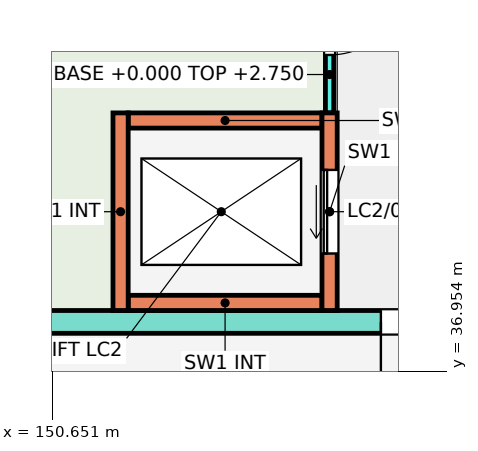
"""IFC4 building model, lengths in metres.
Left out: names, types, materials, properties, quantities, classifications, styles, units other than length and angle.
Written with IfcOpenShell. Run it as: python <this file> out.ifc"""

import sys

from ifc_helpers import new_model, si_unit, direction, frame, frame_2d, origin, place, context, subcontext, project, spatial, rectangle, extrude, element, fill, save


model = new_model("IFC4")
c1 = context("Model", 3, precision=1e-05, world=origin(), true_north=direction((0.0, 1.0)))
c2 = subcontext(c1, "Body", "Model", "MODEL_VIEW")
j1 = project(units=[si_unit("LENGTHUNIT", "METRE"), si_unit("PLANEANGLEUNIT", "RADIAN")], contexts=[c1])
p1 = place(None, origin())
s1 = spatial("IfcSite", under=j1, at=p1, CompositionType="ELEMENT")
p2 = place(p1, origin())
s2 = spatial("IfcBuilding", under=s1, at=p2, CompositionType="ELEMENT")
p3 = place(p2, origin())
s3 = spatial("IfcBuildingStorey", under=s2, at=p3, CompositionType="ELEMENT", Elevation=0.0)
p4 = place(p3, frame((145.2, 37.6, -0.25), z_axis=(0.0, 0.0, 1.0), x_axis=(1.0, 0.0, 0.0)))
e1 = element("IfcWall", 1, at=p4, inside=s3, PredefinedType="SOLIDWALL", context=c2, shape_type="SweptSolid", body=[
    extrude(rectangle(XDim=22.0, YDim=0.3, at=frame_2d((11.0, 0.0))), origin(), (0.0, 0.0, 1.0), 3.25),
])
p5 = place(p4, frame((14.298, 0.0, 1.15)))
e2 = element("IfcOpeningElement", 2, at=p5, cuts=e1, PredefinedType="OPENING", context=c2, shape_type="SweptSolid", body=[
    extrude(rectangle(XDim=1.2, YDim=1.5, at=frame_2d((0.6, 0.75))), frame((0.0, 0.16, 0.0), z_axis=(0.0, -1.0, 0.0), x_axis=(1.0, 0.0, 0.0)), (0.0, 0.0, 1.0), 0.32),
])
p6 = place(p4, frame((9.775, 0.0, 0.25)))
e3 = element("IfcOpeningElement", 3, at=p6, cuts=e1, PredefinedType="OPENING", context=c2, shape_type="SweptSolid", body=[
    extrude(rectangle(XDim=1.2, YDim=2.1, at=frame_2d((0.6, 1.05))), frame((0.0, 0.16, 0.0), z_axis=(0.0, -1.0, 0.0), x_axis=(1.0, 0.0, 0.0)), (0.0, 0.0, 1.0), 0.32),
])
p7 = place(p4, frame((11.85, 0.0, 0.25)))
e4 = element("IfcOpeningElement", 4, at=p7, cuts=e1, PredefinedType="OPENING", context=c2, shape_type="SweptSolid", body=[
    extrude(rectangle(XDim=1.0, YDim=2.1, at=frame_2d((0.5, 1.05))), frame((0.0, 0.16, 0.0), z_axis=(0.0, -1.0, 0.0), x_axis=(1.0, 0.0, 0.0)), (0.0, 0.0, 1.0), 0.32),
])
p8 = place(p3, frame((154.3, 40.35, 0.0), z_axis=(0.0, 0.0, 1.0), x_axis=(0.0, 1.0, 0.0)))
e5 = element("IfcWall", 5, at=p8, inside=s3, PredefinedType="PARTITIONING", context=c2, shape_type="SweptSolid", body=[
    extrude(rectangle(XDim=2.525, YDim=0.11, at=frame_2d((1.262, 0.0))), origin(), (0.0, 0.0, 1.0), 2.75),
])
p9 = place(p8, frame((0.762, 0.0, 0.0)))
e6 = element("IfcOpeningElement", 6, at=p9, cuts=e5, PredefinedType="OPENING", context=c2, shape_type="SweptSolid", body=[
    extrude(rectangle(XDim=1.0, YDim=2.1, at=frame_2d((0.5, 1.05))), frame((0.0, 0.065, 0.0), z_axis=(0.0, -1.0, 0.0), x_axis=(1.0, 0.0, 0.0)), (0.0, 0.0, 1.0), 0.13),
])
for number, where, z_axis, x_axis in (
    (7, (151.65, 40.25, -1.05), (0.0, 0.0, 1.0), (1.0, 0.0, 0.0)),
    (8, (151.65, 37.85, -1.05), (0.0, 0.0, 1.0), (1.0, 0.0, 0.0)),
):
    element("IfcWall", number, at=place(p3, frame(where, z_axis=z_axis, x_axis=x_axis)), inside=s3, PredefinedType="SOLIDWALL", context=c2, shape_type="SweptSolid", body=[
        extrude(rectangle(XDim=2.55, YDim=0.2, at=frame_2d((1.275, 0.0))), origin(), (0.0, 0.0, 1.0), 4.05),
    ])
p10 = place(p3, frame((151.55, 37.75, -1.05), z_axis=(0.0, 0.0, 1.0), x_axis=(0.0, 1.0, 0.0)))
e9 = element("IfcWall", 9, at=p10, inside=s3, PredefinedType="SOLIDWALL", context=c2, shape_type="SweptSolid", body=[
    extrude(rectangle(XDim=2.6, YDim=0.2, at=frame_2d((1.3, 0.0))), origin(), (0.0, 0.0, 1.0), 4.05),
])
p11 = place(p3, frame((154.3, 37.75, -1.05), z_axis=(0.0, 0.0, 1.0), x_axis=(0.0, 1.0, 0.0)))
e10 = element("IfcWall", 10, at=p11, inside=s3, PredefinedType="SOLIDWALL", context=c2, shape_type="SweptSolid", body=[
    extrude(rectangle(XDim=2.6, YDim=0.2, at=frame_2d((1.3, 0.0))), origin(), (0.0, 0.0, 1.0), 4.05),
])
p12 = place(p11, frame((0.75, 0.0, 1.05)))
e11 = element("IfcOpeningElement", 11, at=p12, cuts=e10, PredefinedType="OPENING", context=c2, shape_type="SweptSolid", body=[
    extrude(rectangle(XDim=1.1, YDim=2.1, at=frame_2d((0.55, 1.05))), frame((0.0, 0.11, 0.0), z_axis=(0.0, -1.0, 0.0), x_axis=(1.0, 0.0, 0.0)), (0.0, 0.0, 1.0), 0.22),
])
p13 = place(p6, frame((1.2, 0.0, 0.0), z_axis=(0.0, 0.0, 1.0), x_axis=(-1.0, 0.0, 0.0)))
e12 = element("IfcDoor", 12, at=p13, inside=s3, OperationType="SINGLE_SWING_RIGHT", PredefinedType="DOOR", context=c2, shape_type="SweptSolid", body=[
    extrude(rectangle(XDim=1.2, YDim=2.1, at=frame_2d((0.6, 1.05))), frame((0.0, 0.025, 0.0), z_axis=(0.0, -1.0, 0.0), x_axis=(1.0, 0.0, 0.0)), (0.0, 0.0, 1.0), 0.05),
])
fill(e3, e12)
p14 = place(p9, origin())
e13 = element("IfcDoor", 13, at=p14, inside=s3, OperationType="SINGLE_SWING_RIGHT", PredefinedType="DOOR", context=c2, shape_type="SweptSolid", body=[
    extrude(rectangle(XDim=1.0, YDim=2.1, at=frame_2d((0.5, 1.05))), frame((0.0, 0.025, 0.0), z_axis=(0.0, -1.0, 0.0), x_axis=(1.0, 0.0, 0.0)), (0.0, 0.0, 1.0), 0.05),
])
fill(e6, e13)
p15 = place(p12, origin())
e14 = element("IfcDoor", 14, at=p15, inside=s3, OperationType="SLIDING_TO_LEFT", PredefinedType="DOOR", context=c2, shape_type="SweptSolid", body=[
    extrude(rectangle(XDim=1.1, YDim=2.1, at=frame_2d((0.55, 1.05))), frame((0.0, 0.025, 0.0), z_axis=(0.0, -1.0, 0.0), x_axis=(1.0, 0.0, 0.0)), (0.0, 0.0, 1.0), 0.05),
])
fill(e11, e14)
save(model, sys.argv[1])
